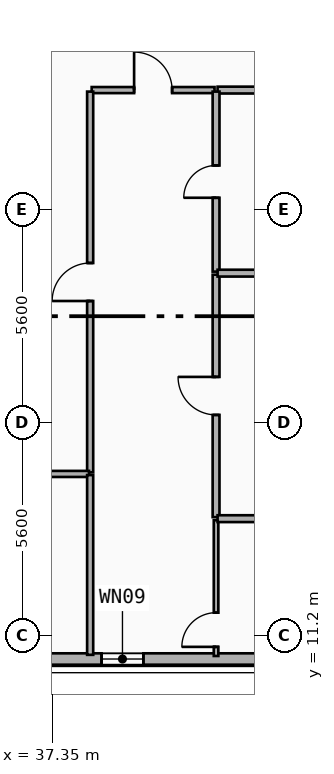
"""IFC4 building model, lengths in metres.
Left out: names, types, materials, properties, quantities, classifications, styles, units other than length and angle.
Written with IfcOpenShell. Run it as: python <this file> out.ifc"""

import sys

from ifc_helpers import new_model, si_unit, direction, frame, frame_2d, origin, place, context, subcontext, project, spatial, rectangle, extrude, element, fill, save


model = new_model("IFC4")
c1 = context("Model", 3, precision=1e-05, world=origin(), true_north=direction((0.0, 1.0)))
c2 = subcontext(c1, "Body", "Model", "MODEL_VIEW")
j1 = project(units=[si_unit("LENGTHUNIT", "METRE"), si_unit("PLANEANGLEUNIT", "RADIAN")], contexts=[c1])
p1 = place(None, origin())
s1 = spatial("IfcSite", under=j1, at=p1, CompositionType="ELEMENT")
p2 = place(p1, origin())
s2 = spatial("IfcBuilding", under=s1, at=p2, CompositionType="ELEMENT")
p3 = place(p2, frame((0.0, 0.0, 148.35)))
s3 = spatial("IfcBuildingStorey", under=s2, at=p3, CompositionType="ELEMENT", Elevation=148.35)
p4 = place(p3, frame((48.0, 10.58, 0.0), z_axis=(0.0, 0.0, 1.0), x_axis=(-1.0, 0.0, 0.0)))
e1 = element("IfcWall", 1, at=p4, inside=s3, PredefinedType="SOLIDWALL", context=c2, shape_type="SweptSolid", body=[
    extrude(rectangle(XDim=38.4, YDim=0.3, at=frame_2d((19.2, 0.0))), origin(), (0.0, 0.0, 1.0), 3.29),
])
p5 = place(p4, frame((36.19, 0.0, 0.34)))
e2 = element("IfcOpeningElement", 2, at=p5, cuts=e1, PredefinedType="OPENING", context=c2, shape_type="SweptSolid", body=[
    extrude(rectangle(XDim=1.8, YDim=1.8, at=frame_2d((0.9, 0.9))), frame((0.0, 0.16, 0.0), z_axis=(0.0, -1.0, 0.0), x_axis=(1.0, 0.0, 0.0)), (0.0, 0.0, 1.0), 0.32),
])
p6 = place(p4, frame((27.938, 0.0, 0.34)))
e3 = element("IfcOpeningElement", 3, at=p6, cuts=e1, PredefinedType="OPENING", context=c2, shape_type="SweptSolid", body=[
    extrude(rectangle(XDim=1.2, YDim=1.5, at=frame_2d((0.6, 0.75))), frame((0.0, 0.16, 0.0), z_axis=(0.0, -1.0, 0.0), x_axis=(1.0, 0.0, 0.0)), (0.0, 0.0, 1.0), 0.32),
])
p7 = place(p4, frame((25.719, 0.0, 0.34)))
e4 = element("IfcOpeningElement", 4, at=p7, cuts=e1, PredefinedType="OPENING", context=c2, shape_type="SweptSolid", body=[
    extrude(rectangle(XDim=1.4, YDim=1.8, at=frame_2d((0.7, 0.9))), frame((0.0, 0.16, 0.0), z_axis=(0.0, -1.0, 0.0), x_axis=(1.0, 0.0, 0.0)), (0.0, 0.0, 1.0), 0.32),
])
p8 = place(p4, frame((33.861, 0.0, 1.22)))
e5 = element("IfcOpeningElement", 5, at=p8, cuts=e1, PredefinedType="OPENING", context=c2, shape_type="SweptSolid", body=[
    extrude(rectangle(XDim=1.2, YDim=1.5, at=frame_2d((0.6, 0.75))), frame((0.0, 0.16, 0.0), z_axis=(0.0, -1.0, 0.0), x_axis=(1.0, 0.0, 0.0)), (0.0, 0.0, 1.0), 0.32),
])
p9 = place(p4, frame((20.1, 0.0, 0.65)))
e6 = element("IfcOpeningElement", 6, at=p9, cuts=e1, PredefinedType="OPENING", context=c2, shape_type="SweptSolid", body=[
    extrude(rectangle(XDim=2.1, YDim=2.1, at=frame_2d((1.05, 1.05))), frame((0.0, 0.16, 0.0), z_axis=(0.0, -1.0, 0.0), x_axis=(1.0, 0.0, 0.0)), (0.0, 0.0, 1.0), 0.32),
])
p10 = place(p4, frame((22.95, 0.0, 0.8)))
e7 = element("IfcOpeningElement", 7, at=p10, cuts=e1, PredefinedType="OPENING", context=c2, shape_type="SweptSolid", body=[
    extrude(rectangle(XDim=1.8, YDim=1.8, at=frame_2d((0.9, 0.9))), frame((0.0, 0.16, 0.0), z_axis=(0.0, -1.0, 0.0), x_axis=(1.0, 0.0, 0.0)), (0.0, 0.0, 1.0), 0.32),
])
p11 = place(p4, frame((13.35, 0.0, 0.65)))
e8 = element("IfcOpeningElement", 8, at=p11, cuts=e1, PredefinedType="OPENING", context=c2, shape_type="SweptSolid", body=[
    extrude(rectangle(XDim=2.1, YDim=2.1, at=frame_2d((1.05, 1.05))), frame((0.0, 0.16, 0.0), z_axis=(0.0, -1.0, 0.0), x_axis=(1.0, 0.0, 0.0)), (0.0, 0.0, 1.0), 0.32),
])
p12 = place(p4, frame((8.25, 0.0, 1.68)))
e9 = element("IfcOpeningElement", 9, at=p12, cuts=e1, PredefinedType="OPENING", context=c2, shape_type="SweptSolid", body=[
    extrude(rectangle(XDim=1.1, YDim=1.05, at=frame_2d((0.55, 0.525))), frame((0.0, 0.16, 0.0), z_axis=(0.0, -1.0, 0.0), x_axis=(1.0, 0.0, 0.0)), (0.0, 0.0, 1.0), 0.32),
])
p13 = place(p4, frame((2.9, 0.0, 0.34)))
e10 = element("IfcOpeningElement", 10, at=p13, cuts=e1, PredefinedType="OPENING", context=c2, shape_type="SweptSolid", body=[
    extrude(rectangle(XDim=1.4, YDim=1.8, at=frame_2d((0.7, 0.9))), frame((0.0, 0.16, 0.0), z_axis=(0.0, -1.0, 0.0), x_axis=(1.0, 0.0, 0.0)), (0.0, 0.0, 1.0), 0.32),
])
p14 = place(p4, frame((0.41, 0.0, 0.34)))
e11 = element("IfcOpeningElement", 11, at=p14, cuts=e1, PredefinedType="OPENING", context=c2, shape_type="SweptSolid", body=[
    extrude(rectangle(XDim=1.8, YDim=1.8, at=frame_2d((0.9, 0.9))), frame((0.0, 0.16, 0.0), z_axis=(0.0, -1.0, 0.0), x_axis=(1.0, 0.0, 0.0)), (0.0, 0.0, 1.0), 0.32),
])
p15 = place(p3, frame((38.39, 25.55, 0.0), z_axis=(0.0, 0.0, 1.0), x_axis=(1.0, 0.0, 0.0)))
e12 = element("IfcWall", 12, at=p15, inside=s3, PredefinedType="PARTITIONING", context=c2, shape_type="SweptSolid", body=[
    extrude(rectangle(XDim=3.233, YDim=0.16, at=frame_2d((1.617, 0.0))), origin(), (0.0, 0.0, 1.0), 3.29),
])
p16 = place(p15, frame((1.116, 0.0, 0.0)))
e13 = element("IfcOpeningElement", 13, at=p16, cuts=e12, PredefinedType="OPENING", context=c2, shape_type="SweptSolid", body=[
    extrude(rectangle(XDim=1.0, YDim=2.15, at=frame_2d((0.5, 1.075))), frame((0.0, 0.09, 0.0), z_axis=(0.0, -1.0, 0.0), x_axis=(1.0, 0.0, 0.0)), (0.0, 0.0, 1.0), 0.18),
])
p17 = place(p3, frame((41.703, 25.55, 0.0), z_axis=(0.0, 0.0, 1.0), x_axis=(1.0, 0.0, 0.0)))
e14 = element("IfcWall", 14, at=p17, inside=s3, PredefinedType="PLUMBINGWALL", context=c2, shape_type="SweptSolid", body=[
    extrude(rectangle(XDim=3.657, YDim=0.18, at=frame_2d((1.829, 0.0))), origin(), (0.0, 0.0, 1.0), 2.36),
])
p18 = place(p3, frame((38.35, 15.49, 0.0), z_axis=(0.0, 0.0, 1.0), x_axis=(0.0, 1.0, 0.0)))
e15 = element("IfcWall", 15, at=p18, inside=s3, PredefinedType="PARTITIONING", context=c2, shape_type="SweptSolid", body=[
    extrude(rectangle(XDim=10.02, YDim=0.16, at=frame_2d((5.01, 0.0))), origin(), (0.0, 0.0, 1.0), 2.72),
])
p19 = place(p18, frame((4.51, 0.0, 0.0)))
e16 = element("IfcOpeningElement", 16, at=p19, cuts=e15, PredefinedType="OPENING", context=c2, shape_type="SweptSolid", body=[
    extrude(rectangle(XDim=1.0, YDim=2.15, at=frame_2d((0.5, 1.075))), frame((0.0, 0.09, 0.0), z_axis=(0.0, -1.0, 0.0), x_axis=(1.0, 0.0, 0.0)), (0.0, 0.0, 1.0), 0.18),
])
p20 = place(p3, frame((41.663, 10.66, 0.0), z_axis=(0.0, 0.0, 1.0), x_axis=(0.0, 1.0, 0.0)))
e17 = element("IfcWall", 17, at=p20, inside=s3, PredefinedType="PARTITIONING", context=c2, shape_type="SweptSolid", body=[
    extrude(rectangle(XDim=3.573, YDim=0.12, at=frame_2d((1.787, 0.0))), origin(), (0.0, 0.0, 1.0), 2.91),
])
p21 = place(p20, frame((0.24, 0.0, 0.0)))
e18 = element("IfcOpeningElement", 18, at=p21, cuts=e17, PredefinedType="OPENING", context=c2, shape_type="SweptSolid", body=[
    extrude(rectangle(XDim=0.9, YDim=2.1, at=frame_2d((0.45, 1.05))), frame((0.0, 0.07, 0.0), z_axis=(0.0, -1.0, 0.0), x_axis=(1.0, 0.0, 0.0)), (0.0, 0.0, 1.0), 0.14),
])
p22 = place(p3, frame((41.663, 14.313, 0.0), z_axis=(0.0, 0.0, 1.0), x_axis=(0.0, 1.0, 0.0)))
e19 = element("IfcWall", 19, at=p22, inside=s3, PredefinedType="PLUMBINGWALL", context=c2, shape_type="SweptSolid", body=[
    extrude(rectangle(XDim=6.38, YDim=0.18, at=frame_2d((3.19, 0.0))), origin(), (0.0, 0.0, 1.0), 2.72),
])
p23 = place(p22, frame((2.69, 0.0, 0.0)))
e20 = element("IfcOpeningElement", 20, at=p23, cuts=e19, PredefinedType="OPENING", context=c2, shape_type="SweptSolid", body=[
    extrude(rectangle(XDim=1.0, YDim=2.15, at=frame_2d((0.5, 1.075))), frame((0.0, 0.1, 0.0), z_axis=(0.0, -1.0, 0.0), x_axis=(1.0, 0.0, 0.0)), (0.0, 0.0, 1.0), 0.2),
])
p24 = place(p3, frame((41.663, 20.773, 0.0), z_axis=(0.0, 0.0, 1.0), x_axis=(0.0, 1.0, 0.0)))
e21 = element("IfcWall", 21, at=p24, inside=s3, PredefinedType="PLUMBINGWALL", context=c2, shape_type="SweptSolid", body=[
    extrude(rectangle(XDim=4.737, YDim=0.18, at=frame_2d((2.369, 0.0))), origin(), (0.0, 0.0, 1.0), 2.88),
])
p25 = place(p24, frame((1.944, 0.0, 0.0)))
e22 = element("IfcOpeningElement", 22, at=p25, cuts=e21, PredefinedType="OPENING", context=c2, shape_type="SweptSolid", body=[
    extrude(rectangle(XDim=0.85, YDim=2.1, at=frame_2d((0.425, 1.05))), frame((0.0, 0.1, 0.0), z_axis=(0.0, -1.0, 0.0), x_axis=(1.0, 0.0, 0.0)), (0.0, 0.0, 1.0), 0.2),
])
for number, where, z_axis, x_axis in (
    (23, (41.703, 14.273, 0.0), (0.0, 0.0, 1.0), (1.0, 0.0, 0.0)),
    (24, (41.703, 20.733, 0.0), (0.0, 0.0, 1.0), (1.0, 0.0, 0.0)),
):
    element("IfcWall", number, at=place(p3, frame(where, z_axis=z_axis, x_axis=x_axis)), inside=s3, PredefinedType="PLUMBINGWALL", context=c2, shape_type="SweptSolid", body=[
        extrude(rectangle(XDim=3.657, YDim=0.18, at=frame_2d((1.829, 0.0))), origin(), (0.0, 0.0, 1.0), 2.36),
    ])
p26 = place(p3, frame((36.38, 15.45, 0.0), z_axis=(0.0, 0.0, 1.0), x_axis=(1.0, 0.0, 0.0)))
e25 = element("IfcWall", 25, at=p26, inside=s3, PredefinedType="PARTITIONING", context=c2, shape_type="SweptSolid", body=[
    extrude(rectangle(XDim=1.94, YDim=0.16, at=frame_2d((0.97, 0.0))), origin(), (0.0, 0.0, 1.0), 2.36),
])
p27 = place(p3, frame((38.35, 10.69, 0.0), z_axis=(0.0, 0.0, 1.0), x_axis=(0.0, 1.0, 0.0)))
e26 = element("IfcWall", 26, at=p27, inside=s3, PredefinedType="PARTITIONING", context=c2, shape_type="SweptSolid", body=[
    extrude(rectangle(XDim=4.73, YDim=0.16, at=frame_2d((2.365, 0.0))), origin(), (0.0, 0.0, 1.0), 2.91),
])
p28 = place(p12, origin())
e27 = element("IfcWindow", 27, at=p28, inside=s3, PartitioningType="SINGLE_PANEL", PredefinedType="WINDOW", context=c2, shape_type="SweptSolid", body=[
    extrude(rectangle(XDim=1.1, YDim=1.05, at=frame_2d((0.55, 0.525))), frame((0.0, 0.03, 0.0), z_axis=(0.0, -1.0, 0.0), x_axis=(1.0, 0.0, 0.0)), (0.0, 0.0, 1.0), 0.06),
])
fill(e9, e27)
p29 = place(p16, origin())
e28 = element("IfcDoor", 28, at=p29, inside=s3, OperationType="SINGLE_SWING_LEFT", PredefinedType="DOOR", context=c2, shape_type="SweptSolid", body=[
    extrude(rectangle(XDim=1.0, YDim=2.15, at=frame_2d((0.5, 1.075))), frame((0.0, 0.025, 0.0), z_axis=(0.0, -1.0, 0.0), x_axis=(1.0, 0.0, 0.0)), (0.0, 0.0, 1.0), 0.05),
])
fill(e13, e28)
p30 = place(p19, origin())
e29 = element("IfcDoor", 29, at=p30, inside=s3, OperationType="SINGLE_SWING_LEFT", PredefinedType="DOOR", context=c2, shape_type="SweptSolid", body=[
    extrude(rectangle(XDim=1.0, YDim=2.15, at=frame_2d((0.5, 1.075))), frame((0.0, 0.025, 0.0), z_axis=(0.0, -1.0, 0.0), x_axis=(1.0, 0.0, 0.0)), (0.0, 0.0, 1.0), 0.05),
])
fill(e16, e29)
p31 = place(p21, origin())
e30 = element("IfcDoor", 30, at=p31, inside=s3, OperationType="SINGLE_SWING_LEFT", PredefinedType="DOOR", context=c2, shape_type="SweptSolid", body=[
    extrude(rectangle(XDim=0.9, YDim=2.1, at=frame_2d((0.45, 1.05))), frame((0.0, 0.025, 0.0), z_axis=(0.0, -1.0, 0.0), x_axis=(1.0, 0.0, 0.0)), (0.0, 0.0, 1.0), 0.05),
])
fill(e18, e30)
p32 = place(p23, origin())
e31 = element("IfcDoor", 31, at=p32, inside=s3, OperationType="SINGLE_SWING_RIGHT", PredefinedType="DOOR", context=c2, shape_type="SweptSolid", body=[
    extrude(rectangle(XDim=1.0, YDim=2.15, at=frame_2d((0.5, 1.075))), frame((0.0, 0.025, 0.0), z_axis=(0.0, -1.0, 0.0), x_axis=(1.0, 0.0, 0.0)), (0.0, 0.0, 1.0), 0.05),
])
fill(e20, e31)
p33 = place(p25, origin())
e32 = element("IfcDoor", 32, at=p33, inside=s3, OperationType="SINGLE_SWING_LEFT", PredefinedType="DOOR", context=c2, shape_type="SweptSolid", body=[
    extrude(rectangle(XDim=0.85, YDim=2.1, at=frame_2d((0.425, 1.05))), frame((0.0, 0.025, 0.0), z_axis=(0.0, -1.0, 0.0), x_axis=(1.0, 0.0, 0.0)), (0.0, 0.0, 1.0), 0.05),
])
fill(e22, e32)
save(model, sys.argv[1])
